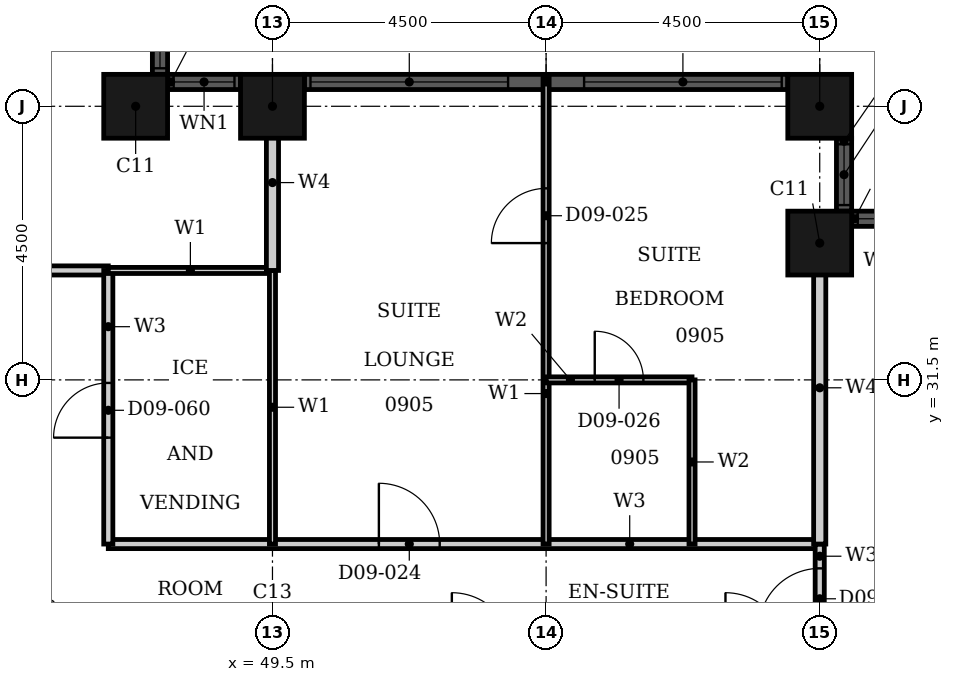
"""IFC4 building model, lengths in metres.
Left out: names, types, materials, properties, quantities, classifications, styles, units other than length and angle.
Written with IfcOpenShell. Run it as: python <this file> out.ifc"""

import sys

from ifc_helpers import new_model, si_unit, direction, frame, frame_2d, origin, origin_2d, place, context, subcontext, project, spatial, rectangle, hollow_rectangle, extrude, element, fill, save


model = new_model("IFC4")
c1 = context("Model", 3, precision=1e-05, world=origin(), true_north=direction((0.0, 1.0)))
c2 = subcontext(c1, "Body", "Model", "MODEL_VIEW")
j1 = project(units=[si_unit("LENGTHUNIT", "METRE"), si_unit("PLANEANGLEUNIT", "RADIAN")], contexts=[c1])
p1 = place(None, origin())
s1 = spatial("IfcSite", under=j1, at=p1, CompositionType="ELEMENT")
p2 = place(p1, origin())
s2 = spatial("IfcBuilding", under=s1, at=p2, CompositionType="ELEMENT")
p3 = place(p2, frame((0.0, 0.0, 44.4)))
s3 = spatial("IfcBuildingStorey", under=s2, at=p3, CompositionType="ELEMENT", Elevation=44.4)
for number, where, z_axis, x_axis in (
    (1, (58.5, 33.75, 0.0), (0.0, 0.0, 1.0), (1.0, 0.0, 0.0)),
    (2, (58.5, 36.0, 0.0), (0.0, 0.0, 1.0), (1.0, 0.0, 0.0)),
    (3, (49.5, 36.0, 0.0), (0.0, 0.0, 1.0), (1.0, 0.0, 0.0)),
    (4, (47.25, 36.0, 0.0), (0.0, 0.0, 1.0), (1.0, 0.0, 0.0)),
):
    element("IfcColumn", number, at=place(p3, frame(where, z_axis=z_axis, x_axis=x_axis)), inside=s3, PredefinedType="COLUMN", context=c2, shape_type="SweptSolid", body=[
        extrude(hollow_rectangle(XDim=1.05, YDim=1.05, WallThickness=0.034, at=origin_2d()), origin(), (0.0, 0.0, 1.0), 3.6),
    ])
p4 = place(p3, frame((60.225, 34.15, 0.0), z_axis=(0.0, 0.0, 1.0), x_axis=(-1.0, 0.0, 0.0)))
e5 = element("IfcWall", 5, at=p4, inside=s3, PredefinedType="SOLIDWALL", context=c2, shape_type="SweptSolid", body=[
    extrude(rectangle(XDim=1.2, YDim=0.25, at=frame_2d((0.6, 0.0))), origin(), (0.0, 0.0, 1.0), 3.6),
])
p5 = place(p4, frame((0.1, 0.0, 0.9)))
e6 = element("IfcOpeningElement", 6, at=p5, cuts=e5, PredefinedType="OPENING", context=c2, shape_type="SweptSolid", body=[
    extrude(rectangle(XDim=1.0, YDim=2.08, at=frame_2d((0.5, 1.04))), frame((0.0, 0.135, 0.0), z_axis=(0.0, -1.0, 0.0), x_axis=(1.0, 0.0, 0.0)), (0.0, 0.0, 1.0), 0.27),
])
p6 = place(p3, frame((58.9, 34.275, 0.0), z_axis=(0.0, 0.0, 1.0), x_axis=(0.0, 1.0, 0.0)))
e7 = element("IfcWall", 7, at=p6, inside=s3, PredefinedType="SOLIDWALL", context=c2, shape_type="SweptSolid", body=[
    extrude(rectangle(XDim=1.2, YDim=0.25, at=frame_2d((0.6, 0.0))), origin(), (0.0, 0.0, 1.0), 3.6),
])
p7 = place(p6, frame((0.1, 0.0, 0.9)))
e8 = element("IfcOpeningElement", 8, at=p7, cuts=e7, PredefinedType="OPENING", context=c2, shape_type="SweptSolid", body=[
    extrude(rectangle(XDim=1.0, YDim=2.08, at=frame_2d((0.5, 1.04))), frame((0.0, 0.135, 0.0), z_axis=(0.0, -1.0, 0.0), x_axis=(1.0, 0.0, 0.0)), (0.0, 0.0, 1.0), 0.27),
])
p8 = place(p3, frame((57.975, 36.4, 0.0), z_axis=(0.0, 0.0, 1.0), x_axis=(-1.0, 0.0, 0.0)))
e9 = element("IfcWall", 9, at=p8, inside=s3, PredefinedType="SOLIDWALL", context=c2, shape_type="SweptSolid", body=[
    extrude(rectangle(XDim=7.95, YDim=0.25, at=frame_2d((3.975, 0.0))), origin(), (0.0, 0.0, 1.0), 3.6),
])
p9 = place(p8, frame((0.1, 0.0, 0.9)))
e10 = element("IfcOpeningElement", 10, at=p9, cuts=e9, PredefinedType="OPENING", context=c2, shape_type="SweptSolid", body=[
    extrude(rectangle(XDim=3.25, YDim=2.08, at=frame_2d((1.625, 1.04))), frame((0.0, 0.135, 0.0), z_axis=(0.0, -1.0, 0.0), x_axis=(1.0, 0.0, 0.0)), (0.0, 0.0, 1.0), 0.27),
])
p10 = place(p8, frame((4.6, 0.0, 0.9)))
e11 = element("IfcOpeningElement", 11, at=p10, cuts=e9, PredefinedType="OPENING", context=c2, shape_type="SweptSolid", body=[
    extrude(rectangle(XDim=3.25, YDim=2.08, at=frame_2d((1.625, 1.04))), frame((0.0, 0.135, 0.0), z_axis=(0.0, -1.0, 0.0), x_axis=(1.0, 0.0, 0.0)), (0.0, 0.0, 1.0), 0.27),
])
p11 = place(p3, frame((48.975, 36.4, 0.0), z_axis=(0.0, 0.0, 1.0), x_axis=(-1.0, 0.0, 0.0)))
e12 = element("IfcWall", 12, at=p11, inside=s3, PredefinedType="SOLIDWALL", context=c2, shape_type="SweptSolid", body=[
    extrude(rectangle(XDim=1.2, YDim=0.25, at=frame_2d((0.6, 0.0))), origin(), (0.0, 0.0, 1.0), 3.6),
])
p12 = place(p11, frame((0.1, 0.0, 0.9)))
e13 = element("IfcOpeningElement", 13, at=p12, cuts=e12, PredefinedType="OPENING", context=c2, shape_type="SweptSolid", body=[
    extrude(rectangle(XDim=1.0, YDim=2.08, at=frame_2d((0.5, 1.04))), frame((0.0, 0.135, 0.0), z_axis=(0.0, -1.0, 0.0), x_axis=(1.0, 0.0, 0.0)), (0.0, 0.0, 1.0), 0.27),
])
p13 = place(p3, frame((47.65, 36.525, 0.0), z_axis=(0.0, 0.0, 1.0), x_axis=(0.0, 1.0, 0.0)))
e14 = element("IfcWall", 14, at=p13, inside=s3, PredefinedType="SOLIDWALL", context=c2, shape_type="SweptSolid", body=[
    extrude(rectangle(XDim=1.2, YDim=0.25, at=frame_2d((0.6, 0.0))), origin(), (0.0, 0.0, 1.0), 3.6),
])
p14 = place(p13, frame((0.1, 0.0, 0.9)))
e15 = element("IfcOpeningElement", 15, at=p14, cuts=e14, PredefinedType="OPENING", context=c2, shape_type="SweptSolid", body=[
    extrude(rectangle(XDim=1.0, YDim=2.08, at=frame_2d((0.5, 1.04))), frame((0.0, 0.135, 0.0), z_axis=(0.0, -1.0, 0.0), x_axis=(1.0, 0.0, 0.0)), (0.0, 0.0, 1.0), 0.27),
])
p15 = place(p3, frame((46.8, 28.8, 0.0), z_axis=(0.0, 0.0, 1.0), x_axis=(1.0, 0.0, 0.0)))
e16 = element("IfcWall", 16, at=p15, inside=s3, PredefinedType="PARTITIONING", context=c2, shape_type="SweptSolid", body=[
    extrude(rectangle(XDim=11.7, YDim=0.15, at=frame_2d((5.85, 0.0))), origin(), (0.0, 0.0, 1.0), 3.2),
])
p16 = place(p15, frame((4.45, 0.0, 0.0)))
e17 = element("IfcOpeningElement", 17, at=p16, cuts=e16, PredefinedType="OPENING", context=c2, shape_type="SweptSolid", body=[
    extrude(rectangle(XDim=1.0, YDim=2.1, at=frame_2d((0.5, 1.05))), frame((0.0, 0.085, 0.0), z_axis=(0.0, -1.0, 0.0), x_axis=(1.0, 0.0, 0.0)), (0.0, 0.0, 1.0), 0.17),
])
p17 = place(p3, frame((33.3, 33.3, 0.0), z_axis=(0.0, 0.0, 1.0), x_axis=(1.0, 0.0, 0.0)))
e18 = element("IfcWall", 18, at=p17, inside=s3, PredefinedType="PARTITIONING", context=c2, shape_type="SweptSolid", body=[
    extrude(rectangle(XDim=13.5, YDim=0.15, at=frame_2d((6.75, 0.0))), origin(), (0.0, 0.0, 1.0), 3.2),
])
p18 = place(p17, frame((10.15, 0.0, 0.0)))
e19 = element("IfcOpeningElement", 19, at=p18, cuts=e18, PredefinedType="OPENING", context=c2, shape_type="SweptSolid", body=[
    extrude(rectangle(XDim=1.0, YDim=2.1, at=frame_2d((0.5, 1.05))), frame((0.0, 0.085, 0.0), z_axis=(0.0, -1.0, 0.0), x_axis=(1.0, 0.0, 0.0)), (0.0, 0.0, 1.0), 0.17),
])
p19 = place(p17, frame((0.75, 0.0, 0.0)))
e20 = element("IfcOpeningElement", 20, at=p19, cuts=e18, PredefinedType="OPENING", context=c2, shape_type="SweptSolid", body=[
    extrude(rectangle(XDim=0.9, YDim=2.1, at=frame_2d((0.45, 1.05))), frame((0.0, 0.085, 0.0), z_axis=(0.0, -1.0, 0.0), x_axis=(1.0, 0.0, 0.0)), (0.0, 0.0, 1.0), 0.17),
])
p20 = place(p17, frame((4.35, 0.0, 0.0)))
e21 = element("IfcOpeningElement", 21, at=p20, cuts=e18, PredefinedType="OPENING", context=c2, shape_type="SweptSolid", body=[
    extrude(rectangle(XDim=0.9, YDim=2.1, at=frame_2d((0.45, 1.05))), frame((0.0, 0.085, 0.0), z_axis=(0.0, -1.0, 0.0), x_axis=(1.0, 0.0, 0.0)), (0.0, 0.0, 1.0), 0.17),
])
p21 = place(p3, frame((46.8, 28.8, 0.0), z_axis=(0.0, 0.0, 1.0), x_axis=(0.0, 1.0, 0.0)))
e22 = element("IfcWall", 22, at=p21, inside=s3, PredefinedType="PARTITIONING", context=c2, shape_type="SweptSolid", body=[
    extrude(rectangle(XDim=4.5, YDim=0.15, at=frame_2d((2.25, 0.0))), origin(), (0.0, 0.0, 1.0), 3.2),
])
p22 = place(p21, frame((1.75, 0.0, 0.0)))
e23 = element("IfcOpeningElement", 23, at=p22, cuts=e22, PredefinedType="OPENING", context=c2, shape_type="SweptSolid", body=[
    extrude(rectangle(XDim=0.9, YDim=2.1, at=frame_2d((0.45, 1.05))), frame((0.0, 0.085, 0.0), z_axis=(0.0, -1.0, 0.0), x_axis=(1.0, 0.0, 0.0)), (0.0, 0.0, 1.0), 0.17),
])
p23 = place(p3, frame((58.5, 27.0, 0.0), z_axis=(0.0, 0.0, 1.0), x_axis=(0.0, 1.0, 0.0)))
e24 = element("IfcWall", 24, at=p23, inside=s3, PredefinedType="PARTITIONING", context=c2, shape_type="SweptSolid", body=[
    extrude(rectangle(XDim=1.8, YDim=0.15, at=frame_2d((0.9, 0.0))), origin(), (0.0, 0.0, 1.0), 3.2),
])
p24 = place(p23, frame((0.4, 0.0, 0.0)))
e25 = element("IfcOpeningElement", 25, at=p24, cuts=e24, PredefinedType="OPENING", context=c2, shape_type="SweptSolid", body=[
    extrude(rectangle(XDim=1.0, YDim=2.1, at=frame_2d((0.5, 1.05))), frame((0.0, 0.085, 0.0), z_axis=(0.0, -1.0, 0.0), x_axis=(1.0, 0.0, 0.0)), (0.0, 0.0, 1.0), 0.17),
])
p25 = place(p3, frame((46.8, 33.3, 0.0), z_axis=(0.0, 0.0, 1.0), x_axis=(1.0, 0.0, 0.0)))
e26 = element("IfcWall", 26, at=p25, inside=s3, PredefinedType="PARTITIONING", context=c2, shape_type="SweptSolid", body=[
    extrude(rectangle(XDim=2.7, YDim=0.1, at=frame_2d((1.35, 0.0))), origin(), (0.0, 0.0, 1.0), 3.2),
])
p26 = place(p3, frame((49.5, 28.8, 0.0), z_axis=(0.0, 0.0, 1.0), x_axis=(0.0, 1.0, 0.0)))
e27 = element("IfcWall", 27, at=p26, inside=s3, PredefinedType="PARTITIONING", context=c2, shape_type="SweptSolid", body=[
    extrude(rectangle(XDim=4.5, YDim=0.1, at=frame_2d((2.25, 0.0))), origin(), (0.0, 0.0, 1.0), 2.28),
])
p27 = place(p3, frame((54.0, 28.8, 0.0), z_axis=(0.0, 0.0, 1.0), x_axis=(0.0, 1.0, 0.0)))
e28 = element("IfcWall", 28, at=p27, inside=s3, PredefinedType="PARTITIONING", context=c2, shape_type="SweptSolid", body=[
    extrude(rectangle(XDim=7.665, YDim=0.1, at=frame_2d((3.833, 0.0))), origin(), (0.0, 0.0, 1.0), 3.2),
])
p28 = place(p27, frame((4.95, 0.0, 0.0)))
e29 = element("IfcOpeningElement", 29, at=p28, cuts=e28, PredefinedType="OPENING", context=c2, shape_type="SweptSolid", body=[
    extrude(rectangle(XDim=0.9, YDim=2.1, at=frame_2d((0.45, 1.05))), frame((0.0, 0.06, 0.0), z_axis=(0.0, -1.0, 0.0), x_axis=(1.0, 0.0, 0.0)), (0.0, 0.0, 1.0), 0.12),
])
p29 = place(p3, frame((49.5, 33.3, 0.0), z_axis=(0.0, 0.0, 1.0), x_axis=(0.0, 1.0, 0.0)))
e30 = element("IfcWall", 30, at=p29, inside=s3, PredefinedType="PARTITIONING", context=c2, shape_type="SweptSolid", body=[
    extrude(rectangle(XDim=2.89, YDim=0.2, at=frame_2d((1.445, 0.0))), origin(), (0.0, 0.0, 1.0), 2.28),
])
p30 = place(p3, frame((58.5, 28.8, 0.0), z_axis=(0.0, 0.0, 1.0), x_axis=(0.0, 1.0, 0.0)))
e31 = element("IfcWall", 31, at=p30, inside=s3, PredefinedType="PARTITIONING", context=c2, shape_type="SweptSolid", body=[
    extrude(rectangle(XDim=5.14, YDim=0.2, at=frame_2d((2.57, 0.0))), origin(), (0.0, 0.0, 1.0), 3.2),
])
p31 = place(p3, frame((54.0, 31.5, 0.0), z_axis=(0.0, 0.0, 1.0), x_axis=(1.0, 0.0, 0.0)))
e32 = element("IfcWall", 32, at=p31, inside=s3, PredefinedType="PARTITIONING", context=c2, shape_type="SweptSolid", body=[
    extrude(rectangle(XDim=2.4, YDim=0.1, at=frame_2d((1.2, 0.0))), origin(), (0.0, 0.0, 1.0), 2.48),
])
p32 = place(p31, frame((0.8, 0.0, 0.0)))
e33 = element("IfcOpeningElement", 33, at=p32, cuts=e32, PredefinedType="OPENING", context=c2, shape_type="SweptSolid", body=[
    extrude(rectangle(XDim=0.8, YDim=2.1, at=frame_2d((0.4, 1.05))), frame((0.0, 0.06, 0.0), z_axis=(0.0, -1.0, 0.0), x_axis=(1.0, 0.0, 0.0)), (0.0, 0.0, 1.0), 0.12),
])
p33 = place(p3, frame((56.4, 28.8, 0.0), z_axis=(0.0, 0.0, 1.0), x_axis=(0.0, 1.0, 0.0)))
e34 = element("IfcWall", 34, at=p33, inside=s3, PredefinedType="PARTITIONING", context=c2, shape_type="SweptSolid", body=[
    extrude(rectangle(XDim=2.7, YDim=0.1, at=frame_2d((1.35, 0.0))), origin(), (0.0, 0.0, 1.0), 3.2),
])
p34 = place(p5, origin())
e35 = element("IfcWindow", 35, at=p34, inside=s3, PartitioningType="SINGLE_PANEL", PredefinedType="WINDOW", context=c2, shape_type="SweptSolid", body=[
    extrude(rectangle(XDim=1.0, YDim=2.08, at=frame_2d((0.5, 1.04))), frame((0.0, 0.03, 0.0), z_axis=(0.0, -1.0, 0.0), x_axis=(1.0, 0.0, 0.0)), (0.0, 0.0, 1.0), 0.06),
])
fill(e6, e35)
p35 = place(p7, origin())
e36 = element("IfcWindow", 36, at=p35, inside=s3, PartitioningType="SINGLE_PANEL", PredefinedType="WINDOW", context=c2, shape_type="SweptSolid", body=[
    extrude(rectangle(XDim=1.0, YDim=2.08, at=frame_2d((0.5, 1.04))), frame((0.0, 0.03, 0.0), z_axis=(0.0, -1.0, 0.0), x_axis=(1.0, 0.0, 0.0)), (0.0, 0.0, 1.0), 0.06),
])
fill(e8, e36)
p36 = place(p9, origin())
e37 = element("IfcWindow", 37, at=p36, inside=s3, PartitioningType="SINGLE_PANEL", PredefinedType="WINDOW", context=c2, shape_type="SweptSolid", body=[
    extrude(rectangle(XDim=3.25, YDim=2.08, at=frame_2d((1.625, 1.04))), frame((0.0, 0.03, 0.0), z_axis=(0.0, -1.0, 0.0), x_axis=(1.0, 0.0, 0.0)), (0.0, 0.0, 1.0), 0.06),
])
fill(e10, e37)
p37 = place(p10, origin())
e38 = element("IfcWindow", 38, at=p37, inside=s3, PartitioningType="SINGLE_PANEL", PredefinedType="WINDOW", context=c2, shape_type="SweptSolid", body=[
    extrude(rectangle(XDim=3.25, YDim=2.08, at=frame_2d((1.625, 1.04))), frame((0.0, 0.03, 0.0), z_axis=(0.0, -1.0, 0.0), x_axis=(1.0, 0.0, 0.0)), (0.0, 0.0, 1.0), 0.06),
])
fill(e11, e38)
p38 = place(p12, origin())
e39 = element("IfcWindow", 39, at=p38, inside=s3, PartitioningType="SINGLE_PANEL", PredefinedType="WINDOW", context=c2, shape_type="SweptSolid", body=[
    extrude(rectangle(XDim=1.0, YDim=2.08, at=frame_2d((0.5, 1.04))), frame((0.0, 0.03, 0.0), z_axis=(0.0, -1.0, 0.0), x_axis=(1.0, 0.0, 0.0)), (0.0, 0.0, 1.0), 0.06),
])
fill(e13, e39)
p39 = place(p14, origin())
e40 = element("IfcWindow", 40, at=p39, inside=s3, PartitioningType="SINGLE_PANEL", PredefinedType="WINDOW", context=c2, shape_type="SweptSolid", body=[
    extrude(rectangle(XDim=1.0, YDim=2.08, at=frame_2d((0.5, 1.04))), frame((0.0, 0.03, 0.0), z_axis=(0.0, -1.0, 0.0), x_axis=(1.0, 0.0, 0.0)), (0.0, 0.0, 1.0), 0.06),
])
fill(e15, e40)
p40 = place(p16, origin())
e41 = element("IfcDoor", 41, at=p40, inside=s3, OperationType="SINGLE_SWING_LEFT", PredefinedType="DOOR", context=c2, shape_type="SweptSolid", body=[
    extrude(rectangle(XDim=1.0, YDim=2.1, at=frame_2d((0.5, 1.05))), frame((0.0, 0.025, 0.0), z_axis=(0.0, -1.0, 0.0), x_axis=(1.0, 0.0, 0.0)), (0.0, 0.0, 1.0), 0.05),
])
fill(e17, e41)
p41 = place(p28, origin())
e42 = element("IfcDoor", 42, at=p41, inside=s3, OperationType="SINGLE_SWING_RIGHT", PredefinedType="DOOR", context=c2, shape_type="SweptSolid", body=[
    extrude(rectangle(XDim=0.9, YDim=2.1, at=frame_2d((0.45, 1.05))), frame((0.0, 0.025, 0.0), z_axis=(0.0, -1.0, 0.0), x_axis=(1.0, 0.0, 0.0)), (0.0, 0.0, 1.0), 0.05),
])
fill(e29, e42)
p42 = place(p32, origin())
e43 = element("IfcDoor", 43, at=p42, inside=s3, OperationType="SINGLE_SWING_RIGHT", PredefinedType="DOOR", context=c2, shape_type="SweptSolid", body=[
    extrude(rectangle(XDim=0.8, YDim=2.1, at=frame_2d((0.4, 1.05))), frame((0.0, 0.025, 0.0), z_axis=(0.0, -1.0, 0.0), x_axis=(1.0, 0.0, 0.0)), (0.0, 0.0, 1.0), 0.05),
])
fill(e33, e43)
p43 = place(p24, origin())
e44 = element("IfcDoor", 44, at=p43, inside=s3, OperationType="SINGLE_SWING_LEFT", PredefinedType="DOOR", context=c2, shape_type="SweptSolid", body=[
    extrude(rectangle(XDim=1.0, YDim=2.1, at=frame_2d((0.5, 1.05))), frame((0.0, 0.025, 0.0), z_axis=(0.0, -1.0, 0.0), x_axis=(1.0, 0.0, 0.0)), (0.0, 0.0, 1.0), 0.05),
])
fill(e25, e44)
p44 = place(p22, origin())
e45 = element("IfcDoor", 45, at=p44, inside=s3, OperationType="SINGLE_SWING_RIGHT", PredefinedType="DOOR", context=c2, shape_type="SweptSolid", body=[
    extrude(rectangle(XDim=0.9, YDim=2.1, at=frame_2d((0.45, 1.05))), frame((0.0, 0.025, 0.0), z_axis=(0.0, -1.0, 0.0), x_axis=(1.0, 0.0, 0.0)), (0.0, 0.0, 1.0), 0.05),
])
fill(e23, e45)
save(model, sys.argv[1])
